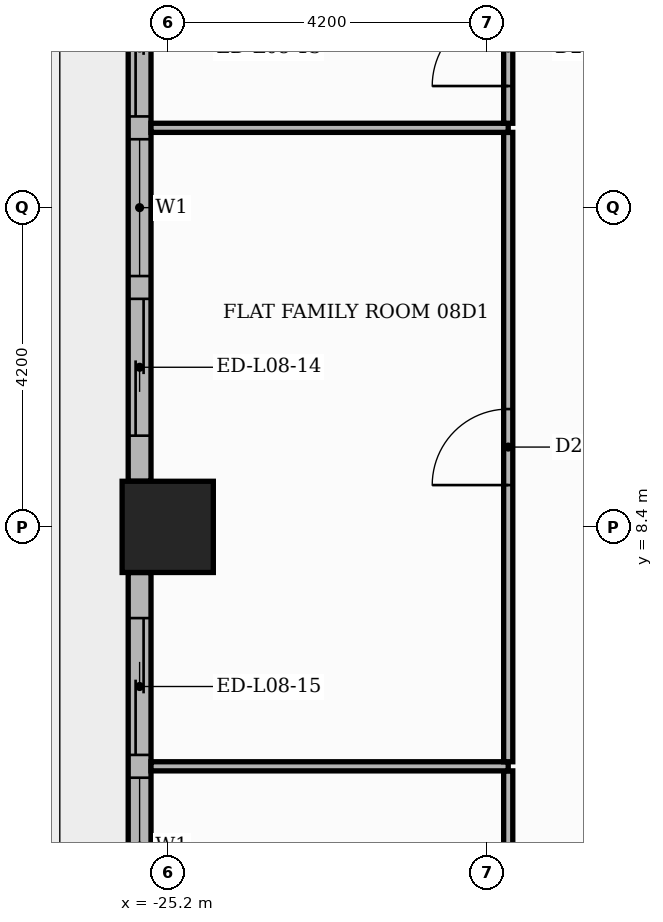
"""IFC4 building model, lengths in metres.
Left out: names, types, materials, properties, quantities, classifications, styles, units other than length and angle.
Written with IfcOpenShell. Run it as: python <this file> out.ifc"""

import sys

from ifc_helpers import new_model, si_unit, direction, frame, frame_2d, origin, origin_2d, place, context, subcontext, project, spatial, rectangle, extrude, element, fill, save


model = new_model("IFC4")
c1 = context("Model", 3, precision=1e-05, world=origin(), true_north=direction((0.0, 1.0)))
c2 = subcontext(c1, "Body", "Model", "MODEL_VIEW")
j1 = project(units=[si_unit("LENGTHUNIT", "METRE"), si_unit("PLANEANGLEUNIT", "RADIAN")], contexts=[c1])
p1 = place(None, origin())
s1 = spatial("IfcSite", under=j1, at=p1, CompositionType="ELEMENT")
p2 = place(p1, origin())
s2 = spatial("IfcBuilding", under=s1, at=p2, CompositionType="ELEMENT")
p3 = place(p2, frame((0.0, 0.0, 38.7)))
s3 = spatial("IfcBuildingStorey", under=s2, at=p3, CompositionType="ELEMENT", Elevation=38.7)
p4 = place(p3, frame((-25.2, 8.4, 0.0), z_axis=(0.0, 0.0, 1.0), x_axis=(1.0, 0.0, 0.0)))
e1 = element("IfcColumn", 1, at=p4, inside=s3, PredefinedType="COLUMN", context=c2, shape_type="SweptSolid", body=[
    extrude(rectangle(XDim=1.2, YDim=1.2, at=origin_2d()), origin(), (0.0, 0.0, 1.0), 3.9),
])
p5 = place(p3, frame((-25.57, 16.2, 0.0), z_axis=(0.0, 0.0, 1.0), x_axis=(0.0, -1.0, 0.0)))
e2 = element("IfcWall", 2, at=p5, inside=s3, PredefinedType="STANDARD", context=c2, shape_type="SweptSolid", body=[
    extrude(rectangle(XDim=7.2, YDim=0.3, at=frame_2d((3.6, 0.0))), origin(), (0.0, 0.0, 1.0), 3.48),
])
p6 = place(p5, frame((0.6, 0.0, 0.0)))
e3 = element("IfcOpeningElement", 3, at=p6, cuts=e2, PredefinedType="OPENING", context=c2, shape_type="SweptSolid", body=[
    extrude(rectangle(XDim=1.8, YDim=2.4, at=frame_2d((0.9, 1.2))), frame((0.0, 0.16, 0.0), z_axis=(0.0, -1.0, 0.0), x_axis=(1.0, 0.0, 0.0)), (0.0, 0.0, 1.0), 0.32),
])
p7 = place(p5, frame((2.7, 0.0, 0.9)))
e4 = element("IfcOpeningElement", 4, at=p7, cuts=e2, PredefinedType="OPENING", context=c2, shape_type="SweptSolid", body=[
    extrude(rectangle(XDim=1.8, YDim=2.1, at=frame_2d((0.9, 1.05))), frame((0.0, 0.16, 0.0), z_axis=(0.0, -1.0, 0.0), x_axis=(1.0, 0.0, 0.0)), (0.0, 0.0, 1.0), 0.32),
])
p8 = place(p5, frame((4.8, 0.0, 0.0)))
e5 = element("IfcOpeningElement", 5, at=p8, cuts=e2, PredefinedType="OPENING", context=c2, shape_type="SweptSolid", body=[
    extrude(rectangle(XDim=1.8, YDim=2.4, at=frame_2d((0.9, 1.2))), frame((0.0, 0.16, 0.0), z_axis=(0.0, -1.0, 0.0), x_axis=(1.0, 0.0, 0.0)), (0.0, 0.0, 1.0), 0.32),
])
p9 = place(p3, frame((-25.57, 7.8, 0.0), z_axis=(0.0, 0.0, 1.0), x_axis=(0.0, -1.0, 0.0)))
e6 = element("IfcWall", 6, at=p9, inside=s3, PredefinedType="STANDARD", context=c2, shape_type="SweptSolid", body=[
    extrude(rectangle(XDim=7.2, YDim=0.3, at=frame_2d((3.6, 0.0))), origin(), (0.0, 0.0, 1.0), 3.48),
])
p10 = place(p9, frame((0.6, 0.0, 0.0)))
e7 = element("IfcOpeningElement", 7, at=p10, cuts=e6, PredefinedType="OPENING", context=c2, shape_type="SweptSolid", body=[
    extrude(rectangle(XDim=1.8, YDim=2.4, at=frame_2d((0.9, 1.2))), frame((0.0, 0.16, 0.0), z_axis=(0.0, -1.0, 0.0), x_axis=(1.0, 0.0, 0.0)), (0.0, 0.0, 1.0), 0.32),
])
p11 = place(p9, frame((2.7, 0.0, 0.9)))
e8 = element("IfcOpeningElement", 8, at=p11, cuts=e6, PredefinedType="OPENING", context=c2, shape_type="SweptSolid", body=[
    extrude(rectangle(XDim=1.8, YDim=2.1, at=frame_2d((0.9, 1.05))), frame((0.0, 0.16, 0.0), z_axis=(0.0, -1.0, 0.0), x_axis=(1.0, 0.0, 0.0)), (0.0, 0.0, 1.0), 0.32),
])
p12 = place(p9, frame((4.8, 0.0, 0.0)))
e9 = element("IfcOpeningElement", 9, at=p12, cuts=e6, PredefinedType="OPENING", context=c2, shape_type="SweptSolid", body=[
    extrude(rectangle(XDim=1.8, YDim=2.4, at=frame_2d((0.9, 1.2))), frame((0.0, 0.16, 0.0), z_axis=(0.0, -1.0, 0.0), x_axis=(1.0, 0.0, 0.0)), (0.0, 0.0, 1.0), 0.32),
])
p13 = place(p3, frame((-20.72, -3.09, 0.0), z_axis=(0.0, 0.0, 1.0), x_axis=(0.0, 1.0, 0.0)))
e10 = element("IfcWall", 10, at=p13, inside=s3, PredefinedType="PARTITIONING", context=c2, shape_type="SweptSolid", body=[
    extrude(rectangle(XDim=8.28, YDim=0.12, at=frame_2d((4.14, 0.0))), origin(), (0.0, 0.0, 1.0), 3.48),
])
p14 = place(p13, frame((3.69, 0.0, 0.0)))
e11 = element("IfcOpeningElement", 11, at=p14, cuts=e10, PredefinedType="OPENING", context=c2, shape_type="SweptSolid", body=[
    extrude(rectangle(XDim=0.9, YDim=2.1, at=frame_2d((0.45, 1.05))), frame((0.0, 0.07, 0.0), z_axis=(0.0, -1.0, 0.0), x_axis=(1.0, 0.0, 0.0)), (0.0, 0.0, 1.0), 0.14),
])
p15 = place(p3, frame((-25.42, 5.25, 0.0), z_axis=(0.0, 0.0, 1.0), x_axis=(1.0, 0.0, 0.0)))
e12 = element("IfcWall", 12, at=p15, inside=s3, PredefinedType="PARTITIONING", context=c2, shape_type="SweptSolid", body=[
    extrude(rectangle(XDim=4.7, YDim=0.12, at=frame_2d((2.35, 0.0))), origin(), (0.0, 0.0, 1.0), 3.48),
])
p16 = place(p3, frame((-20.72, 5.31, 0.0), z_axis=(0.0, 0.0, 1.0), x_axis=(0.0, 1.0, 0.0)))
e13 = element("IfcWall", 13, at=p16, inside=s3, PredefinedType="PARTITIONING", context=c2, shape_type="SweptSolid", body=[
    extrude(rectangle(XDim=8.28, YDim=0.12, at=frame_2d((4.14, 0.0))), origin(), (0.0, 0.0, 1.0), 3.48),
])
p17 = place(p16, frame((3.64, 0.0, 0.0)))
e14 = element("IfcOpeningElement", 14, at=p17, cuts=e13, PredefinedType="OPENING", context=c2, shape_type="SweptSolid", body=[
    extrude(rectangle(XDim=1.0, YDim=2.1, at=frame_2d((0.5, 1.05))), frame((0.0, 0.07, 0.0), z_axis=(0.0, -1.0, 0.0), x_axis=(1.0, 0.0, 0.0)), (0.0, 0.0, 1.0), 0.14),
])
p18 = place(p3, frame((-25.42, 13.65, 0.0), z_axis=(0.0, 0.0, 1.0), x_axis=(1.0, 0.0, 0.0)))
e15 = element("IfcWall", 15, at=p18, inside=s3, PredefinedType="PARTITIONING", context=c2, shape_type="SweptSolid", body=[
    extrude(rectangle(XDim=4.7, YDim=0.12, at=frame_2d((2.35, 0.0))), origin(), (0.0, 0.0, 1.0), 3.48),
])
p19 = place(p3, frame((-20.72, 13.71, 0.0), z_axis=(0.0, 0.0, 1.0), x_axis=(0.0, 1.0, 0.0)))
e16 = element("IfcWall", 16, at=p19, inside=s3, PredefinedType="PARTITIONING", context=c2, shape_type="SweptSolid", body=[
    extrude(rectangle(XDim=1.98, YDim=0.12, at=frame_2d((0.99, 0.0))), origin(), (0.0, 0.0, 1.0), 3.48),
])
p20 = place(p19, frame((0.49, 0.0, 0.0)))
e17 = element("IfcOpeningElement", 17, at=p20, cuts=e16, PredefinedType="OPENING", context=c2, shape_type="SweptSolid", body=[
    extrude(rectangle(XDim=1.0, YDim=2.1, at=frame_2d((0.5, 1.05))), frame((0.0, 0.07, 0.0), z_axis=(0.0, -1.0, 0.0), x_axis=(1.0, 0.0, 0.0)), (0.0, 0.0, 1.0), 0.14),
])
p21 = place(p6, origin())
e18 = element("IfcDoor", 18, at=p21, inside=s3, OperationType="SLIDING_TO_LEFT", PredefinedType="DOOR", context=c2, shape_type="SweptSolid", body=[
    extrude(rectangle(XDim=1.8, YDim=2.4, at=frame_2d((0.9, 1.2))), frame((0.0, 0.025, 0.0), z_axis=(0.0, -1.0, 0.0), x_axis=(1.0, 0.0, 0.0)), (0.0, 0.0, 1.0), 0.05),
])
fill(e3, e18)
p22 = place(p7, origin())
e19 = element("IfcWindow", 19, at=p22, inside=s3, PartitioningType="SINGLE_PANEL", PredefinedType="WINDOW", context=c2, shape_type="SweptSolid", body=[
    extrude(rectangle(XDim=1.8, YDim=2.1, at=frame_2d((0.9, 1.05))), frame((0.0, 0.03, 0.0), z_axis=(0.0, -1.0, 0.0), x_axis=(1.0, 0.0, 0.0)), (0.0, 0.0, 1.0), 0.06),
])
fill(e4, e19)
p23 = place(p8, origin())
e20 = element("IfcDoor", 20, at=p23, inside=s3, OperationType="SLIDING_TO_RIGHT", PredefinedType="DOOR", context=c2, shape_type="SweptSolid", body=[
    extrude(rectangle(XDim=1.8, YDim=2.4, at=frame_2d((0.9, 1.2))), frame((0.0, 0.025, 0.0), z_axis=(0.0, -1.0, 0.0), x_axis=(1.0, 0.0, 0.0)), (0.0, 0.0, 1.0), 0.05),
])
fill(e5, e20)
p24 = place(p10, origin())
e21 = element("IfcDoor", 21, at=p24, inside=s3, OperationType="SLIDING_TO_LEFT", PredefinedType="DOOR", context=c2, shape_type="SweptSolid", body=[
    extrude(rectangle(XDim=1.8, YDim=2.4, at=frame_2d((0.9, 1.2))), frame((0.0, 0.025, 0.0), z_axis=(0.0, -1.0, 0.0), x_axis=(1.0, 0.0, 0.0)), (0.0, 0.0, 1.0), 0.05),
])
fill(e7, e21)
p25 = place(p11, origin())
e22 = element("IfcWindow", 22, at=p25, inside=s3, PartitioningType="SINGLE_PANEL", PredefinedType="WINDOW", context=c2, shape_type="SweptSolid", body=[
    extrude(rectangle(XDim=1.8, YDim=2.1, at=frame_2d((0.9, 1.05))), frame((0.0, 0.03, 0.0), z_axis=(0.0, -1.0, 0.0), x_axis=(1.0, 0.0, 0.0)), (0.0, 0.0, 1.0), 0.06),
])
fill(e8, e22)
p26 = place(p20, origin())
e23 = element("IfcDoor", 23, at=p26, inside=s3, OperationType="SINGLE_SWING_LEFT", PredefinedType="DOOR", context=c2, shape_type="SweptSolid", body=[
    extrude(rectangle(XDim=1.0, YDim=2.1, at=frame_2d((0.5, 1.05))), frame((0.0, 0.025, 0.0), z_axis=(0.0, -1.0, 0.0), x_axis=(1.0, 0.0, 0.0)), (0.0, 0.0, 1.0), 0.05),
])
fill(e17, e23)
p27 = place(p17, origin())
e24 = element("IfcDoor", 24, at=p27, inside=s3, OperationType="SINGLE_SWING_LEFT", PredefinedType="DOOR", context=c2, shape_type="SweptSolid", body=[
    extrude(rectangle(XDim=1.0, YDim=2.1, at=frame_2d((0.5, 1.05))), frame((0.0, 0.025, 0.0), z_axis=(0.0, -1.0, 0.0), x_axis=(1.0, 0.0, 0.0)), (0.0, 0.0, 1.0), 0.05),
])
fill(e14, e24)
save(model, sys.argv[1])
